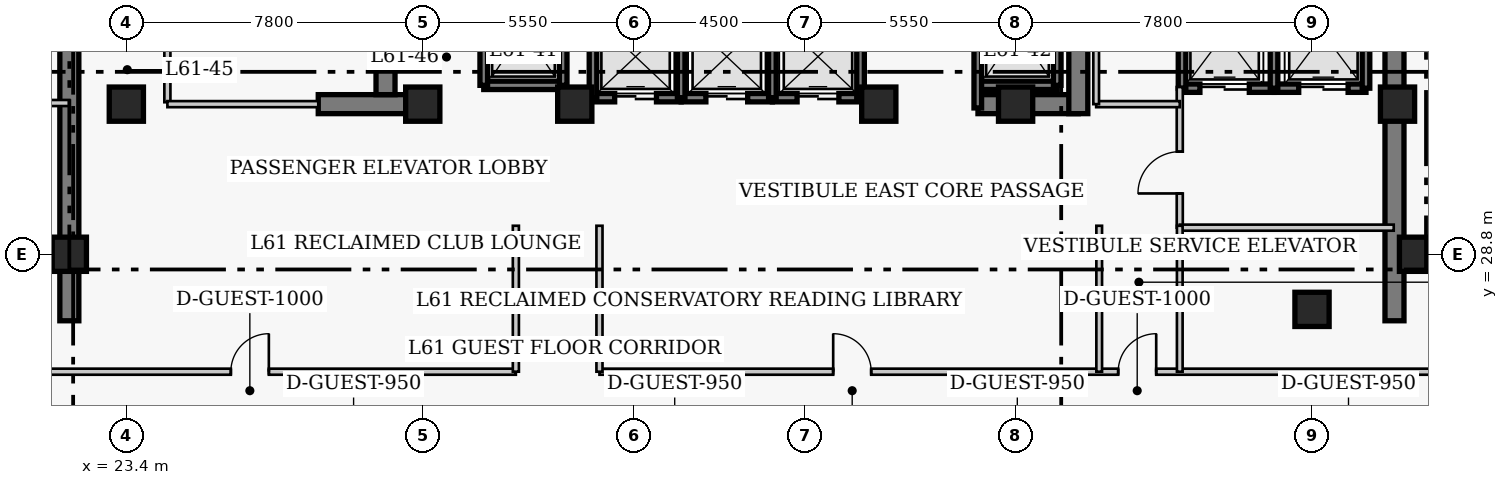
"""IFC4 building model, lengths in metres.
Left out: names, types, materials, properties, quantities, classifications, styles, units other than length and angle.
Written with IfcOpenShell. Run it as: python <this file> out.ifc"""

import sys

from ifc_helpers import new_model, si_unit, direction, frame, frame_2d, origin, origin_2d, place, context, subcontext, project, spatial, rectangle, extrude, element, fill, save


model = new_model("IFC4")
c1 = context("Model", 3, precision=1e-05, world=origin(), true_north=direction((0.0, 1.0)))
c2 = subcontext(c1, "Body", "Model", "MODEL_VIEW")
j1 = project(units=[si_unit("LENGTHUNIT", "METRE"), si_unit("PLANEANGLEUNIT", "RADIAN")], contexts=[c1])
p1 = place(None, origin())
s1 = spatial("IfcSite", under=j1, at=p1, CompositionType="ELEMENT")
p2 = place(p1, origin())
s2 = spatial("IfcBuilding", under=s1, at=p2, CompositionType="ELEMENT")
p3 = place(p2, frame((0.0, 0.0, 245.4)))
s3 = spatial("IfcBuildingStorey", under=s2, at=p3, CompositionType="ELEMENT", Elevation=245.4)
for number, where, z_axis, x_axis in (
    (1, (21.9, 27.05, 0.0), (0.0, 0.0, 1.0), (0.0, 1.0, 0.0)),
    (2, (56.77, 27.05, 0.0), (0.0, 0.0, 1.0), (0.0, 1.0, 0.0)),
):
    element("IfcWall", number, at=place(p3, frame(where, z_axis=z_axis, x_axis=x_axis)), inside=s3, PredefinedType="SHEAR", context=c2, shape_type="SweptSolid", body=[
        extrude(rectangle(XDim=13.52, YDim=0.5, at=frame_2d((6.76, 0.0))), origin(), (0.0, 0.0, 1.0), 4.0),
    ])
p4 = place(p3, frame((28.45, 32.75, 0.0), z_axis=(0.0, 0.0, 1.0), x_axis=(1.0, 0.0, 0.0)))
e3 = element("IfcWall", 3, at=p4, inside=s3, PredefinedType="SHEAR", context=c2, shape_type="SweptSolid", body=[
    extrude(rectangle(XDim=2.4, YDim=0.5, at=frame_2d((1.2, 0.0))), origin(), (0.0, 0.0, 1.0), 4.0),
])
p5 = place(p3, frame((45.81, 32.75, 0.0), z_axis=(0.0, 0.0, 1.0), x_axis=(1.0, 0.0, 0.0)))
e4 = element("IfcWall", 4, at=p5, inside=s3, PredefinedType="SHEAR", context=c2, shape_type="SweptSolid", body=[
    extrude(rectangle(XDim=2.64, YDim=0.5, at=frame_2d((1.32, 0.0))), origin(), (0.0, 0.0, 1.0), 4.0),
])
p6 = place(p3, frame((30.22, 33.0, 0.0), z_axis=(0.0, 0.0, 1.0), x_axis=(0.0, 1.0, 0.0)))
e5 = element("IfcWall", 5, at=p6, inside=s3, PredefinedType="SHEAR", context=c2, shape_type="SweptSolid", body=[
    extrude(rectangle(XDim=7.32, YDim=0.5, at=frame_2d((3.66, 0.0))), origin(), (0.0, 0.0, 1.0), 4.0),
])
p7 = place(p3, frame((48.45, 32.5, 0.0), z_axis=(0.0, 0.0, 1.0), x_axis=(0.0, 1.0, 0.0)))
e6 = element("IfcWall", 6, at=p7, inside=s3, PredefinedType="SHEAR", context=c2, shape_type="SweptSolid", body=[
    extrude(rectangle(XDim=7.82, YDim=0.5, at=frame_2d((3.91, 0.0))), origin(), (0.0, 0.0, 1.0), 4.0),
])
p8 = place(p7, frame((5.7, 0.0, 0.0)))
e7 = element("IfcOpeningElement", 7, at=p8, cuts=e6, PredefinedType="OPENING", context=c2, shape_type="SweptSolid", body=[
    extrude(rectangle(XDim=1.1, YDim=2.15, at=frame_2d((0.55, 1.075))), frame((0.0, 0.26, 0.0), z_axis=(0.0, -1.0, 0.0), x_axis=(1.0, 0.0, 0.0)), (0.0, 0.0, 1.0), 0.52),
])
for number, where, z_axis, x_axis in (
    (8, (21.9, 28.8, 0.0), (0.0, 0.0, 1.0), (1.0, 0.0, 0.0)),
    (9, (57.35, 28.8, 0.0), (0.0, 0.0, 1.0), (1.0, 0.0, 0.0)),
    (10, (23.4, 32.75, 0.0), (0.0, 0.0, 1.0), (1.0, 0.0, 0.0)),
    (11, (31.2, 32.75, 0.0), (0.0, 0.0, 1.0), (1.0, 0.0, 0.0)),
    (12, (35.2, 32.75, 0.0), (0.0, 0.0, 1.0), (1.0, 0.0, 0.0)),
    (13, (43.2, 32.75, 0.0), (0.0, 0.0, 1.0), (1.0, 0.0, 0.0)),
    (14, (46.8, 32.75, 0.0), (0.0, 0.0, 1.0), (1.0, 0.0, 0.0)),
    (15, (54.6, 27.35, 0.0), (0.0, 0.0, 1.0), (1.0, 0.0, 0.0)),
    (16, (56.85, 32.75, 0.0), (0.0, 0.0, 1.0), (1.0, 0.0, 0.0)),
):
    element("IfcColumn", number, at=place(p3, frame(where, z_axis=z_axis, x_axis=x_axis)), inside=s3, PredefinedType="COLUMN", context=c2, shape_type="SweptSolid", body=[
        extrude(rectangle(XDim=0.9, YDim=0.9, at=origin_2d()), origin(), (0.0, 0.0, 1.0), 4.0),
    ])
p9 = place(p3, frame((35.68, 32.92, 0.0), z_axis=(0.0, 0.0, 1.0), x_axis=(1.0, 0.0, 0.0)))
e17 = element("IfcWall", 17, at=p9, inside=s3, PredefinedType="SHEAR", context=c2, shape_type="SweptSolid", body=[
    extrude(rectangle(XDim=2.32, YDim=0.22, at=frame_2d((1.16, 0.0))), origin(), (0.0, 0.0, 1.0), 4.0),
])
p10 = place(p9, frame((0.57, 0.0, 0.0)))
e18 = element("IfcOpeningElement", 18, at=p10, cuts=e17, PredefinedType="OPENING", context=c2, shape_type="SweptSolid", body=[
    extrude(rectangle(XDim=1.1, YDim=2.15, at=frame_2d((0.55, 1.075))), frame((0.0, 0.12, 0.0), z_axis=(0.0, -1.0, 0.0), x_axis=(1.0, 0.0, 0.0)), (0.0, 0.0, 1.0), 0.24),
])
p11 = place(p3, frame((35.68, 32.92, 0.0), z_axis=(0.0, 0.0, 1.0), x_axis=(0.0, 1.0, 0.0)))
e19 = element("IfcWall", 19, at=p11, inside=s3, PredefinedType="SHEAR", context=c2, shape_type="SweptSolid", body=[
    extrude(rectangle(XDim=2.16, YDim=0.2, at=frame_2d((1.08, 0.0))), origin(), (0.0, 0.0, 1.0), 4.0),
])
p12 = place(p3, frame((38.0, 32.92, 0.0), z_axis=(0.0, 0.0, 1.0), x_axis=(1.0, 0.0, 0.0)))
e20 = element("IfcWall", 20, at=p12, inside=s3, PredefinedType="SHEAR", context=c2, shape_type="SweptSolid", body=[
    extrude(rectangle(XDim=2.4, YDim=0.22, at=frame_2d((1.2, 0.0))), origin(), (0.0, 0.0, 1.0), 4.0),
])
p13 = place(p12, frame((0.65, 0.0, 0.0)))
e21 = element("IfcOpeningElement", 21, at=p13, cuts=e20, PredefinedType="OPENING", context=c2, shape_type="SweptSolid", body=[
    extrude(rectangle(XDim=1.1, YDim=2.15, at=frame_2d((0.55, 1.075))), frame((0.0, 0.12, 0.0), z_axis=(0.0, -1.0, 0.0), x_axis=(1.0, 0.0, 0.0)), (0.0, 0.0, 1.0), 0.24),
])
p14 = place(p3, frame((38.0, 32.92, 0.0), z_axis=(0.0, 0.0, 1.0), x_axis=(0.0, 1.0, 0.0)))
e22 = element("IfcWall", 22, at=p14, inside=s3, PredefinedType="SHEAR", context=c2, shape_type="SweptSolid", body=[
    extrude(rectangle(XDim=2.16, YDim=0.2, at=frame_2d((1.08, 0.0))), origin(), (0.0, 0.0, 1.0), 4.0),
])
p15 = place(p3, frame((40.4, 32.92, 0.0), z_axis=(0.0, 0.0, 1.0), x_axis=(1.0, 0.0, 0.0)))
e23 = element("IfcWall", 23, at=p15, inside=s3, PredefinedType="SHEAR", context=c2, shape_type="SweptSolid", body=[
    extrude(rectangle(XDim=2.32, YDim=0.22, at=frame_2d((1.16, 0.0))), origin(), (0.0, 0.0, 1.0), 4.0),
])
p16 = place(p15, frame((0.65, 0.0, 0.0)))
e24 = element("IfcOpeningElement", 24, at=p16, cuts=e23, PredefinedType="OPENING", context=c2, shape_type="SweptSolid", body=[
    extrude(rectangle(XDim=1.1, YDim=2.15, at=frame_2d((0.55, 1.075))), frame((0.0, 0.12, 0.0), z_axis=(0.0, -1.0, 0.0), x_axis=(1.0, 0.0, 0.0)), (0.0, 0.0, 1.0), 0.24),
])
for number, where, z_axis, x_axis in (
    (25, (40.4, 32.92, 0.0), (0.0, 0.0, 1.0), (0.0, 1.0, 0.0)),
    (26, (42.72, 32.92, 0.0), (0.0, 0.0, 1.0), (0.0, 1.0, 0.0)),
):
    element("IfcWall", number, at=place(p3, frame(where, z_axis=z_axis, x_axis=x_axis)), inside=s3, PredefinedType="SHEAR", context=c2, shape_type="SweptSolid", body=[
        extrude(rectangle(XDim=2.16, YDim=0.2, at=frame_2d((1.08, 0.0))), origin(), (0.0, 0.0, 1.0), 4.0),
    ])
p17 = place(p3, frame((51.18, 33.17, 0.0), z_axis=(0.0, 0.0, 1.0), x_axis=(1.0, 0.0, 0.0)))
e27 = element("IfcWall", 27, at=p17, inside=s3, PredefinedType="SHEAR", context=c2, shape_type="SweptSolid", body=[
    extrude(rectangle(XDim=2.42, YDim=0.22, at=frame_2d((1.21, 0.0))), origin(), (0.0, 0.0, 1.0), 4.0),
])
p18 = place(p17, frame((0.47, 0.0, 0.0)))
e28 = element("IfcOpeningElement", 28, at=p18, cuts=e27, PredefinedType="OPENING", context=c2, shape_type="SweptSolid", body=[
    extrude(rectangle(XDim=1.3, YDim=2.15, at=frame_2d((0.65, 1.075))), frame((0.0, 0.12, 0.0), z_axis=(0.0, -1.0, 0.0), x_axis=(1.0, 0.0, 0.0)), (0.0, 0.0, 1.0), 0.24),
])
p19 = place(p3, frame((51.18, 33.17, 0.0), z_axis=(0.0, 0.0, 1.0), x_axis=(0.0, 1.0, 0.0)))
e29 = element("IfcWall", 29, at=p19, inside=s3, PredefinedType="SHEAR", context=c2, shape_type="SweptSolid", body=[
    extrude(rectangle(XDim=2.86, YDim=0.2, at=frame_2d((1.43, 0.0))), origin(), (0.0, 0.0, 1.0), 4.0),
])
p20 = place(p3, frame((53.6, 33.17, 0.0), z_axis=(0.0, 0.0, 1.0), x_axis=(1.0, 0.0, 0.0)))
e30 = element("IfcWall", 30, at=p20, inside=s3, PredefinedType="SHEAR", context=c2, shape_type="SweptSolid", body=[
    extrude(rectangle(XDim=2.42, YDim=0.22, at=frame_2d((1.21, 0.0))), origin(), (0.0, 0.0, 1.0), 4.0),
])
p21 = place(p20, frame((0.65, 0.0, 0.0)))
e31 = element("IfcOpeningElement", 31, at=p21, cuts=e30, PredefinedType="OPENING", context=c2, shape_type="SweptSolid", body=[
    extrude(rectangle(XDim=1.3, YDim=2.15, at=frame_2d((0.65, 1.075))), frame((0.0, 0.12, 0.0), z_axis=(0.0, -1.0, 0.0), x_axis=(1.0, 0.0, 0.0)), (0.0, 0.0, 1.0), 0.24),
])
for number, where, z_axis, x_axis in (
    (32, (53.6, 33.17, 0.0), (0.0, 0.0, 1.0), (0.0, 1.0, 0.0)),
    (33, (56.02, 33.17, 0.0), (0.0, 0.0, 1.0), (0.0, 1.0, 0.0)),
):
    element("IfcWall", number, at=place(p3, frame(where, z_axis=z_axis, x_axis=x_axis)), inside=s3, PredefinedType="SHEAR", context=c2, shape_type="SweptSolid", body=[
        extrude(rectangle(XDim=2.86, YDim=0.2, at=frame_2d((1.43, 0.0))), origin(), (0.0, 0.0, 1.0), 4.0),
    ])
p22 = place(p3, frame((32.805, 33.245, 0.0), z_axis=(0.0, 0.0, 1.0), x_axis=(1.0, 0.0, 0.0)))
e34 = element("IfcWall", 34, at=p22, inside=s3, PredefinedType="SHEAR", context=c2, shape_type="SweptSolid", body=[
    extrude(rectangle(XDim=2.09, YDim=0.22, at=frame_2d((1.045, 0.0))), origin(), (0.0, 0.0, 1.0), 4.0),
])
for number, where, z_axis, x_axis in (
    (35, (32.805, 33.245, 0.0), (0.0, 0.0, 1.0), (0.0, 1.0, 0.0)),
    (36, (34.895, 33.245, 0.0), (0.0, 0.0, 1.0), (0.0, 1.0, 0.0)),
):
    element("IfcWall", number, at=place(p3, frame(where, z_axis=z_axis, x_axis=x_axis)), inside=s3, PredefinedType="SHEAR", context=c2, shape_type="SweptSolid", body=[
        extrude(rectangle(XDim=2.91, YDim=0.2, at=frame_2d((1.455, 0.0))), origin(), (0.0, 0.0, 1.0), 4.0),
    ])
p23 = place(p3, frame((45.805, 33.245, 0.0), z_axis=(0.0, 0.0, 1.0), x_axis=(1.0, 0.0, 0.0)))
e37 = element("IfcWall", 37, at=p23, inside=s3, PredefinedType="SHEAR", context=c2, shape_type="SweptSolid", body=[
    extrude(rectangle(XDim=2.09, YDim=0.22, at=frame_2d((1.045, 0.0))), origin(), (0.0, 0.0, 1.0), 4.0),
])
p24 = place(p3, frame((45.805, 32.65, 0.0), z_axis=(0.0, 0.0, 1.0), x_axis=(0.0, 1.0, 0.0)))
e38 = element("IfcWall", 38, at=p24, inside=s3, PredefinedType="SHEAR", context=c2, shape_type="SweptSolid", body=[
    extrude(rectangle(XDim=3.505, YDim=0.2, at=frame_2d((1.752, 0.0))), origin(), (0.0, 0.0, 1.0), 4.0),
])
p25 = place(p3, frame((47.895, 33.245, 0.0), z_axis=(0.0, 0.0, 1.0), x_axis=(0.0, 1.0, 0.0)))
e39 = element("IfcWall", 39, at=p25, inside=s3, PredefinedType="SHEAR", context=c2, shape_type="SweptSolid", body=[
    extrude(rectangle(XDim=2.91, YDim=0.2, at=frame_2d((1.455, 0.0))), origin(), (0.0, 0.0, 1.0), 4.0),
])
p26 = place(p3, frame((24.48, 32.8, 0.0), z_axis=(0.0, 0.0, 1.0), x_axis=(0.0, 1.0, 0.0)))
e40 = element("IfcWall", 40, at=p26, inside=s3, PredefinedType="PARTITIONING", context=c2, shape_type="SweptSolid", body=[
    extrude(rectangle(XDim=3.57, YDim=0.16, at=frame_2d((1.785, 0.0))), origin(), (0.0, 0.0, 1.0), 3.76),
])
p27 = place(p26, frame((1.604, 0.0, 0.0)))
e41 = element("IfcOpeningElement", 41, at=p27, cuts=e40, PredefinedType="OPENING", context=c2, shape_type="SweptSolid", body=[
    extrude(rectangle(XDim=0.9, YDim=2.1, at=frame_2d((0.45, 1.05))), frame((0.0, 0.09, 0.0), z_axis=(0.0, -1.0, 0.0), x_axis=(1.0, 0.0, 0.0)), (0.0, 0.0, 1.0), 0.18),
])
p28 = place(p3, frame((51.12, 29.5, 0.0), z_axis=(0.0, 0.0, 1.0), x_axis=(0.0, 1.0, 0.0)))
e42 = element("IfcWall", 42, at=p28, inside=s3, PredefinedType="PARTITIONING", context=c2, shape_type="SweptSolid", body=[
    extrude(rectangle(XDim=3.7, YDim=0.16, at=frame_2d((1.85, 0.0))), origin(), (0.0, 0.0, 1.0), 3.76),
])
p29 = place(p28, frame((0.9, 0.0, 0.0)))
e43 = element("IfcOpeningElement", 43, at=p29, cuts=e42, PredefinedType="OPENING", context=c2, shape_type="SweptSolid", body=[
    extrude(rectangle(XDim=1.1, YDim=2.15, at=frame_2d((0.55, 1.075))), frame((0.0, 0.09, 0.0), z_axis=(0.0, -1.0, 0.0), x_axis=(1.0, 0.0, 0.0)), (0.0, 0.0, 1.0), 0.18),
])
p30 = place(p3, frame((51.12, 29.5, 0.0), z_axis=(0.0, 0.0, 1.0), x_axis=(1.0, 0.0, 0.0)))
e44 = element("IfcWall", 44, at=p30, inside=s3, PredefinedType="PARTITIONING", context=c2, shape_type="SweptSolid", body=[
    extrude(rectangle(XDim=5.63, YDim=0.16, at=frame_2d((2.815, 0.0))), origin(), (0.0, 0.0, 1.0), 3.76),
])
p31 = place(p3, frame((24.48, 32.75, 0.0), z_axis=(0.0, 0.0, 1.0), x_axis=(1.0, 0.0, 0.0)))
e45 = element("IfcWall", 45, at=p31, inside=s3, PredefinedType="PARTITIONING", context=c2, shape_type="SweptSolid", body=[
    extrude(rectangle(XDim=3.97, YDim=0.16, at=frame_2d((1.985, 0.0))), origin(), (0.0, 0.0, 1.0), 3.76),
])
p32 = place(p3, frame((48.92, 32.75, 0.0), z_axis=(0.0, 0.0, 1.0), x_axis=(1.0, 0.0, 0.0)))
e46 = element("IfcWall", 46, at=p32, inside=s3, PredefinedType="PARTITIONING", context=c2, shape_type="SweptSolid", body=[
    extrude(rectangle(XDim=2.2, YDim=0.16, at=frame_2d((1.1, 0.0))), origin(), (0.0, 0.0, 1.0), 3.76),
])
p33 = place(p3, frame((48.92, 32.75, 0.0), z_axis=(0.0, 0.0, 1.0), x_axis=(0.0, 1.0, 0.0)))
e47 = element("IfcWall", 47, at=p33, inside=s3, PredefinedType="PARTITIONING", context=c2, shape_type="SweptSolid", body=[
    extrude(rectangle(XDim=3.62, YDim=0.15, at=frame_2d((1.81, 0.0))), origin(), (0.0, 0.0, 1.0), 3.76),
])
p34 = place(p3, frame((19.9, 25.71, 0.0), z_axis=(0.0, 0.0, 1.0), x_axis=(1.0, 0.0, 0.0)))
e48 = element("IfcWall", 48, at=p34, inside=s3, PredefinedType="PARTITIONING", context=c2, shape_type="SweptSolid", body=[
    extrude(rectangle(XDim=13.75, YDim=0.16, at=frame_2d((6.875, 0.0))), origin(), (0.0, 0.0, 1.0), 3.76),
])
p35 = place(p34, frame((6.25, 0.0, 0.0)))
e49 = element("IfcOpeningElement", 49, at=p35, cuts=e48, PredefinedType="OPENING", context=c2, shape_type="SweptSolid", body=[
    extrude(rectangle(XDim=1.0, YDim=2.15, at=frame_2d((0.5, 1.075))), frame((0.0, 0.09, 0.0), z_axis=(0.0, -1.0, 0.0), x_axis=(1.0, 0.0, 0.0)), (0.0, 0.0, 1.0), 0.18),
])
p36 = place(p3, frame((35.85, 25.71, 0.0), z_axis=(0.0, 0.0, 1.0), x_axis=(1.0, 0.0, 0.0)))
e50 = element("IfcWall", 50, at=p36, inside=s3, PredefinedType="PARTITIONING", context=c2, shape_type="SweptSolid", body=[
    extrude(rectangle(XDim=23.45, YDim=0.16, at=frame_2d((11.725, 0.0))), origin(), (0.0, 0.0, 1.0), 3.76),
])
p37 = place(p36, frame((6.15, 0.0, 0.0)))
e51 = element("IfcOpeningElement", 51, at=p37, cuts=e50, PredefinedType="OPENING", context=c2, shape_type="SweptSolid", body=[
    extrude(rectangle(XDim=1.0, YDim=2.15, at=frame_2d((0.5, 1.075))), frame((0.0, 0.09, 0.0), z_axis=(0.0, -1.0, 0.0), x_axis=(1.0, 0.0, 0.0)), (0.0, 0.0, 1.0), 0.18),
])
p38 = place(p36, frame((13.65, 0.0, 0.0)))
e52 = element("IfcOpeningElement", 52, at=p38, cuts=e50, PredefinedType="OPENING", context=c2, shape_type="SweptSolid", body=[
    extrude(rectangle(XDim=1.0, YDim=2.15, at=frame_2d((0.5, 1.075))), frame((0.0, 0.09, 0.0), z_axis=(0.0, -1.0, 0.0), x_axis=(1.0, 0.0, 0.0)), (0.0, 0.0, 1.0), 0.18),
])
for number, where, z_axis, x_axis in (
    (53, (33.65, 25.71, 0.0), (0.0, 0.0, 1.0), (0.0, 1.0, 0.0)),
    (54, (35.85, 25.71, 0.0), (0.0, 0.0, 1.0), (0.0, 1.0, 0.0)),
):
    element("IfcWall", number, at=place(p3, frame(where, z_axis=z_axis, x_axis=x_axis)), inside=s3, PredefinedType="PARTITIONING", context=c2, shape_type="SweptSolid", body=[
        extrude(rectangle(XDim=3.84, YDim=0.16, at=frame_2d((1.92, 0.0))), origin(), (0.0, 0.0, 1.0), 3.76),
    ])
p39 = place(p3, frame((19.96, 32.78, 0.0), z_axis=(0.0, 0.0, 1.0), x_axis=(1.0, 0.0, 0.0)))
e55 = element("IfcWall", 55, at=p39, inside=s3, PredefinedType="PARTITIONING", context=c2, shape_type="SweptSolid", body=[
    extrude(rectangle(XDim=1.94, YDim=0.16, at=frame_2d((0.97, 0.0))), origin(), (0.0, 0.0, 1.0), 3.76),
])
for number, where, z_axis, x_axis in (
    (56, (49.0, 25.71, 0.0), (0.0, 0.0, 1.0), (0.0, 1.0, 0.0)),
    (57, (51.12, 25.71, 0.0), (0.0, 0.0, 1.0), (0.0, 1.0, 0.0)),
):
    element("IfcWall", number, at=place(p3, frame(where, z_axis=z_axis, x_axis=x_axis)), inside=s3, PredefinedType="PARTITIONING", context=c2, shape_type="SweptSolid", body=[
        extrude(rectangle(XDim=3.84, YDim=0.15, at=frame_2d((1.92, 0.0))), origin(), (0.0, 0.0, 1.0), 3.76),
    ])
p40 = place(p10, origin())
e58 = element("IfcDoor", 58, at=p40, inside=s3, OperationType="DOUBLE_DOOR_SLIDING", PredefinedType="DOOR", context=c2, shape_type="SweptSolid", body=[
    extrude(rectangle(XDim=1.1, YDim=2.15, at=frame_2d((0.55, 1.075))), frame((0.0, 0.025, 0.0), z_axis=(0.0, -1.0, 0.0), x_axis=(1.0, 0.0, 0.0)), (0.0, 0.0, 1.0), 0.05),
])
fill(e18, e58)
p41 = place(p13, origin())
e59 = element("IfcDoor", 59, at=p41, inside=s3, OperationType="DOUBLE_DOOR_SLIDING", PredefinedType="DOOR", context=c2, shape_type="SweptSolid", body=[
    extrude(rectangle(XDim=1.1, YDim=2.15, at=frame_2d((0.55, 1.075))), frame((0.0, 0.025, 0.0), z_axis=(0.0, -1.0, 0.0), x_axis=(1.0, 0.0, 0.0)), (0.0, 0.0, 1.0), 0.05),
])
fill(e21, e59)
p42 = place(p16, origin())
e60 = element("IfcDoor", 60, at=p42, inside=s3, OperationType="DOUBLE_DOOR_SLIDING", PredefinedType="DOOR", context=c2, shape_type="SweptSolid", body=[
    extrude(rectangle(XDim=1.1, YDim=2.15, at=frame_2d((0.55, 1.075))), frame((0.0, 0.025, 0.0), z_axis=(0.0, -1.0, 0.0), x_axis=(1.0, 0.0, 0.0)), (0.0, 0.0, 1.0), 0.05),
])
fill(e24, e60)
p43 = place(p18, origin())
e61 = element("IfcDoor", 61, at=p43, inside=s3, OperationType="DOUBLE_DOOR_SLIDING", PredefinedType="DOOR", context=c2, shape_type="SweptSolid", body=[
    extrude(rectangle(XDim=1.3, YDim=2.15, at=frame_2d((0.65, 1.075))), frame((0.0, 0.025, 0.0), z_axis=(0.0, -1.0, 0.0), x_axis=(1.0, 0.0, 0.0)), (0.0, 0.0, 1.0), 0.05),
])
fill(e28, e61)
p44 = place(p21, origin())
e62 = element("IfcDoor", 62, at=p44, inside=s3, OperationType="DOUBLE_DOOR_SLIDING", PredefinedType="DOOR", context=c2, shape_type="SweptSolid", body=[
    extrude(rectangle(XDim=1.3, YDim=2.15, at=frame_2d((0.65, 1.075))), frame((0.0, 0.025, 0.0), z_axis=(0.0, -1.0, 0.0), x_axis=(1.0, 0.0, 0.0)), (0.0, 0.0, 1.0), 0.05),
])
fill(e31, e62)
p45 = place(p29, origin())
e63 = element("IfcDoor", 63, at=p45, inside=s3, OperationType="SINGLE_SWING_LEFT", PredefinedType="DOOR", context=c2, shape_type="SweptSolid", body=[
    extrude(rectangle(XDim=1.1, YDim=2.15, at=frame_2d((0.55, 1.075))), frame((0.0, 0.025, 0.0), z_axis=(0.0, -1.0, 0.0), x_axis=(1.0, 0.0, 0.0)), (0.0, 0.0, 1.0), 0.05),
])
fill(e43, e63)
p46 = place(p35, origin())
e64 = element("IfcDoor", 64, at=p46, inside=s3, OperationType="SINGLE_SWING_RIGHT", PredefinedType="DOOR", context=c2, shape_type="SweptSolid", body=[
    extrude(rectangle(XDim=1.0, YDim=2.15, at=frame_2d((0.5, 1.075))), frame((0.0, 0.025, 0.0), z_axis=(0.0, -1.0, 0.0), x_axis=(1.0, 0.0, 0.0)), (0.0, 0.0, 1.0), 0.05),
])
fill(e49, e64)
p47 = place(p37, origin())
e65 = element("IfcDoor", 65, at=p47, inside=s3, OperationType="SINGLE_SWING_LEFT", PredefinedType="DOOR", context=c2, shape_type="SweptSolid", body=[
    extrude(rectangle(XDim=1.0, YDim=2.15, at=frame_2d((0.5, 1.075))), frame((0.0, 0.025, 0.0), z_axis=(0.0, -1.0, 0.0), x_axis=(1.0, 0.0, 0.0)), (0.0, 0.0, 1.0), 0.05),
])
fill(e51, e65)
p48 = place(p38, origin())
e66 = element("IfcDoor", 66, at=p48, inside=s3, OperationType="SINGLE_SWING_RIGHT", PredefinedType="DOOR", context=c2, shape_type="SweptSolid", body=[
    extrude(rectangle(XDim=1.0, YDim=2.15, at=frame_2d((0.5, 1.075))), frame((0.0, 0.025, 0.0), z_axis=(0.0, -1.0, 0.0), x_axis=(1.0, 0.0, 0.0)), (0.0, 0.0, 1.0), 0.05),
])
fill(e52, e66)
save(model, sys.argv[1])
